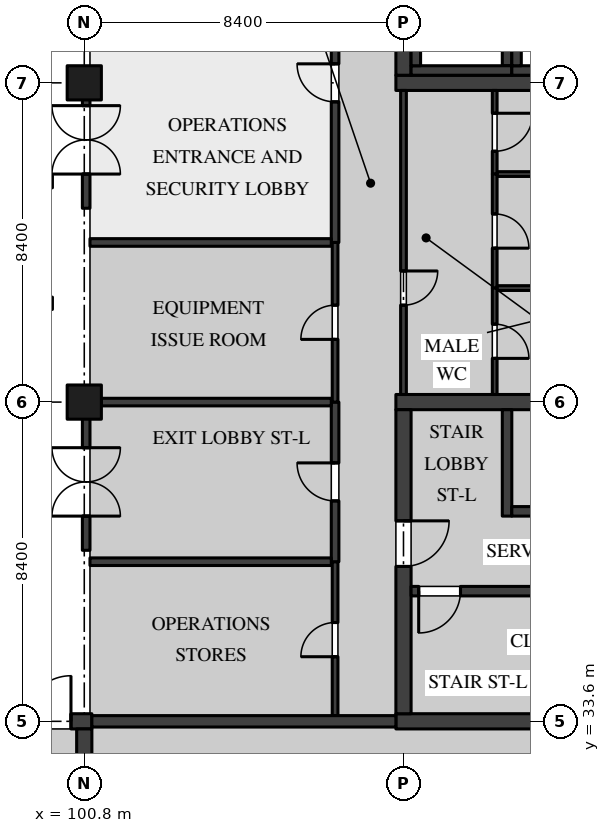
"""IFC4 building model, lengths in metres.
Left out: names, types, materials, properties, quantities, classifications, styles, units other than length and angle.
Written with IfcOpenShell. Run it as: python <this file> out.ifc"""

import sys

from ifc_helpers import new_model, si_unit, direction, frame, frame_2d, origin, origin_2d, place, context, subcontext, project, spatial, rectangle, hollow_circle, extrude, element, fill, save


model = new_model("IFC4")
c1 = context("Model", 3, precision=1e-05, world=origin(), true_north=direction((0.0, 1.0)))
c2 = subcontext(c1, "Body", "Model", "MODEL_VIEW")
j1 = project(units=[si_unit("LENGTHUNIT", "METRE"), si_unit("PLANEANGLEUNIT", "RADIAN")], contexts=[c1])
p1 = place(None, origin())
s1 = spatial("IfcSite", under=j1, at=p1, CompositionType="ELEMENT")
p2 = place(p1, origin())
s2 = spatial("IfcBuilding", under=s1, at=p2, CompositionType="ELEMENT")
p3 = place(p2, origin())
s3 = spatial("IfcBuildingStorey", under=s2, at=p3, CompositionType="ELEMENT", Elevation=0.0)
for number, where, z_axis, x_axis in (
    (1, (100.8, 42.0, 0.0), (0.0, 0.0, 1.0), (1.0, 0.0, 0.0)),
    (2, (100.8, 50.4, 0.0), (0.0, 0.0, 1.0), (1.0, 0.0, 0.0)),
):
    element("IfcColumn", number, at=place(p3, frame(where, z_axis=z_axis, x_axis=x_axis)), inside=s3, PredefinedType="COLUMN", context=c2, shape_type="SweptSolid", body=[
        extrude(rectangle(XDim=0.9, YDim=0.9, at=origin_2d()), origin(), (0.0, 0.0, 1.0), 5.05),
    ])
for number, where, z_axis, x_axis in (
    (3, (99.8, 44.6, 0.0), (0.0, 0.0, 1.0), (1.0, 0.0, 0.0)),
    (4, (99.8, 47.8, 0.0), (0.0, 0.0, 1.0), (1.0, 0.0, 0.0)),
):
    element("IfcColumn", number, at=place(p3, frame(where, z_axis=z_axis, x_axis=x_axis)), inside=s3, PredefinedType="COLUMN", context=c2, shape_type="SweptSolid", body=[
        extrude(hollow_circle(Radius=0.162, WallThickness=0.013, at=origin_2d()), origin(), (0.0, 0.0, 1.0), 4.495),
    ])
p4 = place(p3, frame((92.2, 33.6, 0.0), z_axis=(0.0, 0.0, 1.0), x_axis=(1.0, 0.0, 0.0)))
e5 = element("IfcWall", 5, at=p4, inside=s3, PredefinedType="SHEAR", context=c2, shape_type="SweptSolid", body=[
    extrude(rectangle(XDim=8.8, YDim=0.4, at=frame_2d((4.4, 0.0))), origin(), (0.0, 0.0, 1.0), 5.05),
])
p5 = place(p4, frame((7.05, 0.0, 0.0)))
e6 = element("IfcOpeningElement", 6, at=p5, cuts=e5, PredefinedType="OPENING", context=c2, shape_type="SweptSolid", body=[
    extrude(rectangle(XDim=1.2, YDim=2.1, at=frame_2d((0.6, 1.05))), frame((0.0, 0.21, 0.0), z_axis=(0.0, -1.0, 0.0), x_axis=(1.0, 0.0, 0.0)), (0.0, 0.0, 1.0), 0.42),
])
p6 = place(p3, frame((100.8, 25.4, 0.0), z_axis=(0.0, 0.0, 1.0), x_axis=(0.0, 1.0, 0.0)))
e7 = element("IfcWall", 7, at=p6, inside=s3, PredefinedType="SHEAR", context=c2, shape_type="SweptSolid", body=[
    extrude(rectangle(XDim=8.0, YDim=0.4, at=frame_2d((4.0, 0.0))), origin(), (0.0, 0.0, 1.0), 5.05),
])
p7 = place(p3, frame((109.0, 50.4, 0.0), z_axis=(0.0, 0.0, 1.0), x_axis=(1.0, 0.0, 0.0)))
e8 = element("IfcWall", 8, at=p7, inside=s3, PredefinedType="SHEAR", context=c2, shape_type="SweptSolid", body=[
    extrude(rectangle(XDim=8.8, YDim=0.4, at=frame_2d((4.4, 0.0))), origin(), (0.0, 0.0, 1.0), 5.05),
])
p8 = place(p3, frame((109.2, 50.6, 0.0), z_axis=(0.0, 0.0, 1.0), x_axis=(0.0, 1.0, 0.0)))
e9 = element("IfcWall", 9, at=p8, inside=s3, PredefinedType="SHEAR", context=c2, shape_type="SweptSolid", body=[
    extrude(rectangle(XDim=8.0, YDim=0.4, at=frame_2d((4.0, 0.0))), origin(), (0.0, 0.0, 1.0), 5.05),
])
p9 = place(p8, frame((3.25, 0.0, 0.0)))
e10 = element("IfcOpeningElement", 10, at=p9, cuts=e9, PredefinedType="OPENING", context=c2, shape_type="SweptSolid", body=[
    extrude(rectangle(XDim=1.2, YDim=2.1, at=frame_2d((0.6, 1.05))), frame((0.0, 0.21, 0.0), z_axis=(0.0, -1.0, 0.0), x_axis=(1.0, 0.0, 0.0)), (0.0, 0.0, 1.0), 0.42),
])
for number, where, z_axis, x_axis in (
    (11, (109.0, 33.6, 0.0), (0.0, 0.0, 1.0), (1.0, 0.0, 0.0)),
    (12, (109.0, 42.0, 0.0), (0.0, 0.0, 1.0), (1.0, 0.0, 0.0)),
):
    element("IfcWall", number, at=place(p3, frame(where, z_axis=z_axis, x_axis=x_axis)), inside=s3, PredefinedType="SHEAR", context=c2, shape_type="SweptSolid", body=[
        extrude(rectangle(XDim=8.8, YDim=0.4, at=frame_2d((4.4, 0.0))), origin(), (0.0, 0.0, 1.0), 5.05),
    ])
p10 = place(p3, frame((109.2, 33.8, 0.0), z_axis=(0.0, 0.0, 1.0), x_axis=(0.0, 1.0, 0.0)))
e13 = element("IfcWall", 13, at=p10, inside=s3, PredefinedType="SHEAR", context=c2, shape_type="SweptSolid", body=[
    extrude(rectangle(XDim=8.0, YDim=0.4, at=frame_2d((4.0, 0.0))), origin(), (0.0, 0.0, 1.0), 5.05),
])
p11 = place(p10, frame((3.875, 0.0, 0.0)))
e14 = element("IfcOpeningElement", 14, at=p11, cuts=e13, PredefinedType="OPENING", context=c2, shape_type="SweptSolid", body=[
    extrude(rectangle(XDim=1.2, YDim=2.1, at=frame_2d((0.6, 1.05))), frame((0.0, 0.21, 0.0), z_axis=(0.0, -1.0, 0.0), x_axis=(1.0, 0.0, 0.0)), (0.0, 0.0, 1.0), 0.42),
])
p12 = place(p3, frame((109.4, 37.025, 0.0), z_axis=(0.0, 0.0, 1.0), x_axis=(1.0, 0.0, 0.0)))
e15 = element("IfcWall", 15, at=p12, inside=s3, PredefinedType="SOLIDWALL", context=c2, shape_type="SweptSolid", body=[
    extrude(rectangle(XDim=8.0, YDim=0.25, at=frame_2d((4.0, 0.0))), origin(), (0.0, 0.0, 1.0), 5.05),
])
p13 = place(p12, frame((0.2, 0.0, 0.0)))
e16 = element("IfcOpeningElement", 16, at=p13, cuts=e15, PredefinedType="OPENING", context=c2, shape_type="SweptSolid", body=[
    extrude(rectangle(XDim=1.1, YDim=2.1, at=frame_2d((0.55, 1.05))), frame((0.0, 0.135, 0.0), z_axis=(0.0, -1.0, 0.0), x_axis=(1.0, 0.0, 0.0)), (0.0, 0.0, 1.0), 0.27),
])
p14 = place(p3, frame((111.925, 39.0, 0.0), z_axis=(0.0, 0.0, 1.0), x_axis=(0.0, 1.0, 0.0)))
e17 = element("IfcWall", 17, at=p14, inside=s3, PredefinedType="SOLIDWALL", context=c2, shape_type="SweptSolid", body=[
    extrude(rectangle(XDim=2.8, YDim=0.25, at=frame_2d((1.4, 0.0))), origin(), (0.0, 0.0, 1.0), 5.05),
])
p15 = place(p3, frame((112.05, 39.125, 0.0), z_axis=(0.0, 0.0, 1.0), x_axis=(1.0, 0.0, 0.0)))
e18 = element("IfcWall", 18, at=p15, inside=s3, PredefinedType="SOLIDWALL", context=c2, shape_type="SweptSolid", body=[
    extrude(rectangle(XDim=5.35, YDim=0.25, at=frame_2d((2.675, 0.0))), origin(), (0.0, 0.0, 1.0), 5.05),
])
p16 = place(p15, frame((3.65, 0.0, 0.0)))
e19 = element("IfcOpeningElement", 19, at=p16, cuts=e18, PredefinedType="OPENING", context=c2, shape_type="SweptSolid", body=[
    extrude(rectangle(XDim=0.9, YDim=2.1, at=frame_2d((0.45, 1.05))), frame((0.0, 0.135, 0.0), z_axis=(0.0, -1.0, 0.0), x_axis=(1.0, 0.0, 0.0)), (0.0, 0.0, 1.0), 0.27),
])
p17 = place(p15, frame((0.9, 0.0, 0.0)))
e20 = element("IfcOpeningElement", 20, at=p17, cuts=e18, PredefinedType="OPENING", context=c2, shape_type="SweptSolid", body=[
    extrude(rectangle(XDim=0.8, YDim=2.1, at=frame_2d((0.4, 1.05))), frame((0.0, 0.135, 0.0), z_axis=(0.0, -1.0, 0.0), x_axis=(1.0, 0.0, 0.0)), (0.0, 0.0, 1.0), 0.27),
])
p18 = place(p3, frame((111.925, 50.85, 0.0), z_axis=(0.0, 0.0, 1.0), x_axis=(0.0, 1.0, 0.0)))
e21 = element("IfcWall", 21, at=p18, inside=s3, PredefinedType="SOLIDWALL", context=c2, shape_type="SweptSolid", body=[
    extrude(rectangle(XDim=2.3, YDim=0.25, at=frame_2d((1.15, 0.0))), origin(), (0.0, 0.0, 1.0), 5.05),
])
p19 = place(p3, frame((109.4, 50.725, 0.0), z_axis=(0.0, 0.0, 1.0), x_axis=(1.0, 0.0, 0.0)))
e22 = element("IfcWall", 22, at=p19, inside=s3, PredefinedType="SOLIDWALL", context=c2, shape_type="SweptSolid", body=[
    extrude(rectangle(XDim=2.65, YDim=0.25, at=frame_2d((1.325, 0.0))), origin(), (0.0, 0.0, 1.0), 5.05),
])
p20 = place(p3, frame((109.525, 50.85, 0.0), z_axis=(0.0, 0.0, 1.0), x_axis=(0.0, 1.0, 0.0)))
e23 = element("IfcWall", 23, at=p20, inside=s3, PredefinedType="SOLIDWALL", context=c2, shape_type="SweptSolid", body=[
    extrude(rectangle(XDim=2.3, YDim=0.25, at=frame_2d((1.15, 0.0))), origin(), (0.0, 0.0, 1.0), 5.05),
])
p21 = place(p3, frame((112.05, 50.725, 0.0), z_axis=(0.0, 0.0, 1.0), x_axis=(1.0, 0.0, 0.0)))
e24 = element("IfcWall", 24, at=p21, inside=s3, PredefinedType="SOLIDWALL", context=c2, shape_type="SweptSolid", body=[
    extrude(rectangle(XDim=2.7, YDim=0.25, at=frame_2d((1.35, 0.0))), origin(), (0.0, 0.0, 1.0), 5.05),
])
p22 = place(p3, frame((112.175, 50.85, 0.0), z_axis=(0.0, 0.0, 1.0), x_axis=(0.0, 1.0, 0.0)))
e25 = element("IfcWall", 25, at=p22, inside=s3, PredefinedType="SOLIDWALL", context=c2, shape_type="SweptSolid", body=[
    extrude(rectangle(XDim=2.3, YDim=0.25, at=frame_2d((1.15, 0.0))), origin(), (0.0, 0.0, 1.0), 5.05),
])
p23 = place(p3, frame((109.2, 42.2, 0.0), z_axis=(0.0, 0.0, 1.0), x_axis=(0.0, 1.0, 0.0)))
e26 = element("IfcWall", 26, at=p23, inside=s3, PredefinedType="PARTITIONING", context=c2, shape_type="SweptSolid", body=[
    extrude(rectangle(XDim=8.0, YDim=0.15, at=frame_2d((4.0, 0.0))), origin(), (0.0, 0.0, 1.0), 5.05),
])
p24 = place(p23, frame((2.35, 0.0, 0.0)))
e27 = element("IfcOpeningElement", 27, at=p24, cuts=e26, PredefinedType="OPENING", context=c2, shape_type="SweptSolid", body=[
    extrude(rectangle(XDim=0.9, YDim=2.1, at=frame_2d((0.45, 1.05))), frame((0.0, 0.085, 0.0), z_axis=(0.0, -1.0, 0.0), x_axis=(1.0, 0.0, 0.0)), (0.0, 0.0, 1.0), 0.17),
])
p25 = place(p3, frame((107.4, 33.75, 0.0), z_axis=(0.0, 0.0, 1.0), x_axis=(0.0, 1.0, 0.0)))
e28 = element("IfcWall", 28, at=p25, inside=s3, PredefinedType="PARTITIONING", context=c2, shape_type="SweptSolid", body=[
    extrude(rectangle(XDim=4.05, YDim=0.15, at=frame_2d((2.025, 0.0))), origin(), (0.0, 0.0, 1.0), 5.05),
])
p26 = place(p25, frame((1.55, 0.0, 0.0)))
e29 = element("IfcOpeningElement", 29, at=p26, cuts=e28, PredefinedType="OPENING", context=c2, shape_type="SweptSolid", body=[
    extrude(rectangle(XDim=0.9, YDim=2.1, at=frame_2d((0.45, 1.05))), frame((0.0, 0.085, 0.0), z_axis=(0.0, -1.0, 0.0), x_axis=(1.0, 0.0, 0.0)), (0.0, 0.0, 1.0), 0.17),
])
p27 = place(p3, frame((107.4, 37.8, 0.0), z_axis=(0.0, 0.0, 1.0), x_axis=(0.0, 1.0, 0.0)))
e30 = element("IfcWall", 30, at=p27, inside=s3, PredefinedType="PARTITIONING", context=c2, shape_type="SweptSolid", body=[
    extrude(rectangle(XDim=4.2, YDim=0.2, at=frame_2d((2.1, 0.0))), origin(), (0.0, 0.0, 1.0), 5.05),
])
p28 = place(p27, frame((1.6, 0.0, 0.0)))
e31 = element("IfcOpeningElement", 31, at=p28, cuts=e30, PredefinedType="OPENING", context=c2, shape_type="SweptSolid", body=[
    extrude(rectangle(XDim=1.0, YDim=2.4, at=frame_2d((0.5, 1.2))), frame((0.0, 0.11, 0.0), z_axis=(0.0, -1.0, 0.0), x_axis=(1.0, 0.0, 0.0)), (0.0, 0.0, 1.0), 0.22),
])
p29 = place(p3, frame((107.4, 42.0, 0.0), z_axis=(0.0, 0.0, 1.0), x_axis=(0.0, 1.0, 0.0)))
e32 = element("IfcWall", 32, at=p29, inside=s3, PredefinedType="PARTITIONING", context=c2, shape_type="SweptSolid", body=[
    extrude(rectangle(XDim=4.2, YDim=0.15, at=frame_2d((2.1, 0.0))), origin(), (0.0, 0.0, 1.0), 5.05),
])
p30 = place(p29, frame((1.65, 0.0, 0.0)))
e33 = element("IfcOpeningElement", 33, at=p30, cuts=e32, PredefinedType="OPENING", context=c2, shape_type="SweptSolid", body=[
    extrude(rectangle(XDim=0.9, YDim=2.1, at=frame_2d((0.45, 1.05))), frame((0.0, 0.085, 0.0), z_axis=(0.0, -1.0, 0.0), x_axis=(1.0, 0.0, 0.0)), (0.0, 0.0, 1.0), 0.17),
])
p31 = place(p3, frame((107.4, 46.2, 0.0), z_axis=(0.0, 0.0, 1.0), x_axis=(0.0, 1.0, 0.0)))
e34 = element("IfcWall", 34, at=p31, inside=s3, PredefinedType="PARTITIONING", context=c2, shape_type="SweptSolid", body=[
    extrude(rectangle(XDim=8.4, YDim=0.2, at=frame_2d((4.2, 0.0))), origin(), (0.0, 0.0, 1.0), 5.05),
])
p32 = place(p31, frame((3.7, 0.0, 0.0)))
e35 = element("IfcOpeningElement", 35, at=p32, cuts=e34, PredefinedType="OPENING", context=c2, shape_type="SweptSolid", body=[
    extrude(rectangle(XDim=1.0, YDim=2.4, at=frame_2d((0.5, 1.2))), frame((0.0, 0.11, 0.0), z_axis=(0.0, -1.0, 0.0), x_axis=(1.0, 0.0, 0.0)), (0.0, 0.0, 1.0), 0.22),
])
p33 = place(p3, frame((111.662, 48.0, 0.0), z_axis=(0.0, 0.0, 1.0), x_axis=(1.0, 0.0, 0.0)))
e36 = element("IfcWall", 36, at=p33, inside=s3, PredefinedType="PARTITIONING", context=c2, shape_type="SweptSolid", body=[
    extrude(rectangle(XDim=5.863, YDim=0.125, at=frame_2d((2.931, 0.0))), origin(), (0.0, 0.0, 1.0), 5.05),
])
p34 = place(p3, frame((111.6, 48.0, 0.0), z_axis=(0.0, 0.0, 1.0), x_axis=(0.0, 1.0, 0.0)))
e37 = element("IfcWall", 37, at=p34, inside=s3, PredefinedType="PARTITIONING", context=c2, shape_type="SweptSolid", body=[
    extrude(rectangle(XDim=2.2, YDim=0.125, at=frame_2d((1.1, 0.0))), origin(), (0.0, 0.0, 1.0), 5.05),
])
p35 = place(p34, frame((0.6, 0.0, 0.0)))
e38 = element("IfcOpeningElement", 38, at=p35, cuts=e37, PredefinedType="OPENING", context=c2, shape_type="SweptSolid", body=[
    extrude(rectangle(XDim=1.0, YDim=2.1, at=frame_2d((0.5, 1.05))), frame((0.0, 0.073, 0.0), z_axis=(0.0, -1.0, 0.0), x_axis=(1.0, 0.0, 0.0)), (0.0, 0.0, 1.0), 0.145),
])
p36 = place(p3, frame((111.6, 45.0, 0.0), z_axis=(0.0, 0.0, 1.0), x_axis=(0.0, 1.0, 0.0)))
e39 = element("IfcWall", 39, at=p36, inside=s3, PredefinedType="PARTITIONING", context=c2, shape_type="SweptSolid", body=[
    extrude(rectangle(XDim=3.0, YDim=0.125, at=frame_2d((1.5, 0.0))), origin(), (0.0, 0.0, 1.0), 5.05),
])
p37 = place(p36, frame((1.05, 0.0, 0.0)))
e40 = element("IfcOpeningElement", 40, at=p37, cuts=e39, PredefinedType="OPENING", context=c2, shape_type="SweptSolid", body=[
    extrude(rectangle(XDim=0.9, YDim=2.1, at=frame_2d((0.45, 1.05))), frame((0.0, 0.073, 0.0), z_axis=(0.0, -1.0, 0.0), x_axis=(1.0, 0.0, 0.0)), (0.0, 0.0, 1.0), 0.145),
])
p38 = place(p3, frame((111.662, 45.0, 0.0), z_axis=(0.0, 0.0, 1.0), x_axis=(1.0, 0.0, 0.0)))
e41 = element("IfcWall", 41, at=p38, inside=s3, PredefinedType="PARTITIONING", context=c2, shape_type="SweptSolid", body=[
    extrude(rectangle(XDim=5.863, YDim=0.125, at=frame_2d((2.931, 0.0))), origin(), (0.0, 0.0, 1.0), 5.05),
])
p39 = place(p3, frame((111.6, 42.2, 0.0), z_axis=(0.0, 0.0, 1.0), x_axis=(0.0, 1.0, 0.0)))
e42 = element("IfcWall", 42, at=p39, inside=s3, PredefinedType="PARTITIONING", context=c2, shape_type="SweptSolid", body=[
    extrude(rectangle(XDim=2.8, YDim=0.125, at=frame_2d((1.4, 0.0))), origin(), (0.0, 0.0, 1.0), 5.05),
])
p40 = place(p39, frame((0.95, 0.0, 0.0)))
e43 = element("IfcOpeningElement", 43, at=p40, cuts=e42, PredefinedType="OPENING", context=c2, shape_type="SweptSolid", body=[
    extrude(rectangle(XDim=0.9, YDim=2.1, at=frame_2d((0.45, 1.05))), frame((0.0, 0.073, 0.0), z_axis=(0.0, -1.0, 0.0), x_axis=(1.0, 0.0, 0.0)), (0.0, 0.0, 1.0), 0.145),
])
p41 = place(p3, frame((100.95, 37.8, 0.0), z_axis=(0.0, 0.0, 1.0), x_axis=(1.0, 0.0, 0.0)))
e44 = element("IfcWall", 44, at=p41, inside=s3, PredefinedType="PARTITIONING", context=c2, shape_type="SweptSolid", body=[
    extrude(rectangle(XDim=6.35, YDim=0.2, at=frame_2d((3.175, 0.0))), origin(), (0.0, 0.0, 1.0), 5.05),
])
p42 = place(p3, frame((101.25, 42.0, 0.0), z_axis=(0.0, 0.0, 1.0), x_axis=(1.0, 0.0, 0.0)))
e45 = element("IfcWall", 45, at=p42, inside=s3, PredefinedType="PARTITIONING", context=c2, shape_type="SweptSolid", body=[
    extrude(rectangle(XDim=6.05, YDim=0.2, at=frame_2d((3.025, 0.0))), origin(), (0.0, 0.0, 1.0), 5.05),
])
p43 = place(p3, frame((100.95, 46.2, 0.0), z_axis=(0.0, 0.0, 1.0), x_axis=(1.0, 0.0, 0.0)))
e46 = element("IfcWall", 46, at=p43, inside=s3, PredefinedType="PARTITIONING", context=c2, shape_type="SweptSolid", body=[
    extrude(rectangle(XDim=6.35, YDim=0.2, at=frame_2d((3.175, 0.0))), origin(), (0.0, 0.0, 1.0), 5.05),
])
p44 = place(p3, frame((100.85, 49.97, 0.0), z_axis=(0.0, 0.0, 1.0), x_axis=(0.0, -1.0, 0.0)))
e47 = element("IfcWall", 47, at=p44, inside=s3, PredefinedType="SOLIDWALL", context=c2, shape_type="SweptSolid", body=[
    extrude(rectangle(XDim=2.87, YDim=0.2, at=frame_2d((1.435, 0.0))), origin(), (0.0, 0.0, 1.0), 5.05),
])
p45 = place(p44, frame((0.17, 0.0, 0.0)))
e48 = element("IfcOpeningElement", 48, at=p45, cuts=e47, PredefinedType="OPENING", context=c2, shape_type="SweptSolid", body=[
    extrude(rectangle(XDim=1.8, YDim=2.4, at=frame_2d((0.9, 1.2))), frame((0.0, 0.11, 0.0), z_axis=(0.0, -1.0, 0.0), x_axis=(1.0, 0.0, 0.0)), (0.0, 0.0, 1.0), 0.22),
])
p46 = place(p3, frame((100.85, 41.57, 0.0), z_axis=(0.0, 0.0, 1.0), x_axis=(0.0, -1.0, 0.0)))
e49 = element("IfcWall", 49, at=p46, inside=s3, PredefinedType="SOLIDWALL", context=c2, shape_type="SweptSolid", body=[
    extrude(rectangle(XDim=3.47, YDim=0.2, at=frame_2d((1.735, 0.0))), origin(), (0.0, 0.0, 1.0), 5.05),
])
p47 = place(p46, frame((0.77, 0.0, 0.0)))
e50 = element("IfcOpeningElement", 50, at=p47, cuts=e49, PredefinedType="OPENING", context=c2, shape_type="SweptSolid", body=[
    extrude(rectangle(XDim=1.8, YDim=2.4, at=frame_2d((0.9, 1.2))), frame((0.0, 0.11, 0.0), z_axis=(0.0, -1.0, 0.0), x_axis=(1.0, 0.0, 0.0)), (0.0, 0.0, 1.0), 0.22),
])
p48 = place(p3, frame((109.0, 33.6, 0.0), z_axis=(0.0, 0.0, 1.0), x_axis=(-1.0, 0.0, 0.0)))
e51 = element("IfcWall", 51, at=p48, inside=s3, PredefinedType="SOLIDWALL", context=c2, shape_type="SweptSolid", body=[
    extrude(rectangle(XDim=8.0, YDim=0.3, at=frame_2d((4.0, 0.0))), origin(), (0.0, 0.0, 1.0), 5.05),
])
p49 = place(p5, origin())
e52 = element("IfcDoor", 52, at=p49, inside=s3, OperationType="SINGLE_SWING_LEFT", PredefinedType="DOOR", context=c2, shape_type="SweptSolid", body=[
    extrude(rectangle(XDim=1.2, YDim=2.1, at=frame_2d((0.6, 1.05))), frame((0.0, 0.035, 0.0), z_axis=(0.0, -1.0, 0.0), x_axis=(1.0, 0.0, 0.0)), (0.0, 0.0, 1.0), 0.07),
])
fill(e6, e52)
p50 = place(p11, frame((1.2, 0.0, 0.0), z_axis=(0.0, 0.0, 1.0), x_axis=(-1.0, 0.0, 0.0)))
e53 = element("IfcDoor", 53, at=p50, inside=s3, OperationType="SINGLE_SWING_RIGHT", PredefinedType="DOOR", context=c2, shape_type="SweptSolid", body=[
    extrude(rectangle(XDim=1.2, YDim=2.1, at=frame_2d((0.6, 1.05))), frame((0.0, 0.035, 0.0), z_axis=(0.0, -1.0, 0.0), x_axis=(1.0, 0.0, 0.0)), (0.0, 0.0, 1.0), 0.07),
])
fill(e14, e53)
p51 = place(p13, frame((1.1, 0.0, 0.0), z_axis=(0.0, 0.0, 1.0), x_axis=(-1.0, 0.0, 0.0)))
e54 = element("IfcDoor", 54, at=p51, inside=s3, OperationType="SINGLE_SWING_LEFT", PredefinedType="DOOR", context=c2, shape_type="SweptSolid", body=[
    extrude(rectangle(XDim=1.1, YDim=2.1, at=frame_2d((0.55, 1.05))), frame((0.0, 0.035, 0.0), z_axis=(0.0, -1.0, 0.0), x_axis=(1.0, 0.0, 0.0)), (0.0, 0.0, 1.0), 0.07),
])
fill(e16, e54)
p52 = place(p35, frame((1.0, 0.0, 0.0), z_axis=(0.0, 0.0, 1.0), x_axis=(-1.0, 0.0, 0.0)))
e55 = element("IfcDoor", 55, at=p52, inside=s3, OperationType="SINGLE_SWING_RIGHT", PredefinedType="DOOR", context=c2, shape_type="SweptSolid", body=[
    extrude(rectangle(XDim=1.0, YDim=2.1, at=frame_2d((0.5, 1.05))), frame((0.0, 0.02, 0.0), z_axis=(0.0, -1.0, 0.0), x_axis=(1.0, 0.0, 0.0)), (0.0, 0.0, 1.0), 0.04),
])
fill(e38, e55)
p53 = place(p37, frame((0.9, 0.0, 0.0), z_axis=(0.0, 0.0, 1.0), x_axis=(-1.0, 0.0, 0.0)))
e56 = element("IfcDoor", 56, at=p53, inside=s3, OperationType="SINGLE_SWING_LEFT", PredefinedType="DOOR", context=c2, shape_type="SweptSolid", body=[
    extrude(rectangle(XDim=0.9, YDim=2.1, at=frame_2d((0.45, 1.05))), frame((0.0, 0.02, 0.0), z_axis=(0.0, -1.0, 0.0), x_axis=(1.0, 0.0, 0.0)), (0.0, 0.0, 1.0), 0.04),
])
fill(e40, e56)
p54 = place(p24, frame((0.9, 0.0, 0.0), z_axis=(0.0, 0.0, 1.0), x_axis=(-1.0, 0.0, 0.0)))
e57 = element("IfcDoor", 57, at=p54, inside=s3, OperationType="SINGLE_SWING_RIGHT", PredefinedType="DOOR", context=c2, shape_type="SweptSolid", body=[
    extrude(rectangle(XDim=0.9, YDim=2.1, at=frame_2d((0.45, 1.05))), frame((0.0, 0.025, 0.0), z_axis=(0.0, -1.0, 0.0), x_axis=(1.0, 0.0, 0.0)), (0.0, 0.0, 1.0), 0.05),
])
fill(e27, e57)
p55 = place(p40, frame((0.9, 0.0, 0.0), z_axis=(0.0, 0.0, 1.0), x_axis=(-1.0, 0.0, 0.0)))
e58 = element("IfcDoor", 58, at=p55, inside=s3, OperationType="SINGLE_SWING_LEFT", PredefinedType="DOOR", context=c2, shape_type="SweptSolid", body=[
    extrude(rectangle(XDim=0.9, YDim=2.1, at=frame_2d((0.45, 1.05))), frame((0.0, 0.02, 0.0), z_axis=(0.0, -1.0, 0.0), x_axis=(1.0, 0.0, 0.0)), (0.0, 0.0, 1.0), 0.04),
])
fill(e43, e58)
p56 = place(p26, origin())
e59 = element("IfcDoor", 59, at=p56, inside=s3, OperationType="SINGLE_SWING_RIGHT", PredefinedType="DOOR", context=c2, shape_type="SweptSolid", body=[
    extrude(rectangle(XDim=0.9, YDim=2.1, at=frame_2d((0.45, 1.05))), frame((0.0, 0.025, 0.0), z_axis=(0.0, -1.0, 0.0), x_axis=(1.0, 0.0, 0.0)), (0.0, 0.0, 1.0), 0.05),
])
fill(e29, e59)
p57 = place(p28, origin())
e60 = element("IfcDoor", 60, at=p57, inside=s3, OperationType="SINGLE_SWING_LEFT", PredefinedType="DOOR", context=c2, shape_type="SweptSolid", body=[
    extrude(rectangle(XDim=1.0, YDim=2.4, at=frame_2d((0.5, 1.2))), frame((0.0, 0.03, 0.0), z_axis=(0.0, -1.0, 0.0), x_axis=(1.0, 0.0, 0.0)), (0.0, 0.0, 1.0), 0.06),
])
fill(e31, e60)
p58 = place(p30, origin())
e61 = element("IfcDoor", 61, at=p58, inside=s3, OperationType="SINGLE_SWING_RIGHT", PredefinedType="DOOR", context=c2, shape_type="SweptSolid", body=[
    extrude(rectangle(XDim=0.9, YDim=2.1, at=frame_2d((0.45, 1.05))), frame((0.0, 0.025, 0.0), z_axis=(0.0, -1.0, 0.0), x_axis=(1.0, 0.0, 0.0)), (0.0, 0.0, 1.0), 0.05),
])
fill(e33, e61)
p59 = place(p32, origin())
e62 = element("IfcDoor", 62, at=p59, inside=s3, OperationType="SINGLE_SWING_LEFT", PredefinedType="DOOR", context=c2, shape_type="SweptSolid", body=[
    extrude(rectangle(XDim=1.0, YDim=2.4, at=frame_2d((0.5, 1.2))), frame((0.0, 0.03, 0.0), z_axis=(0.0, -1.0, 0.0), x_axis=(1.0, 0.0, 0.0)), (0.0, 0.0, 1.0), 0.06),
])
fill(e35, e62)
p60 = place(p45, frame((1.8, 0.0, 0.0), z_axis=(0.0, 0.0, 1.0), x_axis=(-1.0, 0.0, 0.0)))
e63 = element("IfcDoor", 63, at=p60, inside=s3, OperationType="DOUBLE_DOOR_DOUBLE_SWING", PredefinedType="DOOR", context=c2, shape_type="SweptSolid", body=[
    extrude(rectangle(XDim=1.8, YDim=2.4, at=frame_2d((0.9, 1.2))), frame((0.0, 0.025, 0.0), z_axis=(0.0, -1.0, 0.0), x_axis=(1.0, 0.0, 0.0)), (0.0, 0.0, 1.0), 0.05),
])
fill(e48, e63)
p61 = place(p47, frame((1.8, 0.0, 0.0), z_axis=(0.0, 0.0, 1.0), x_axis=(-1.0, 0.0, 0.0)))
e64 = element("IfcDoor", 64, at=p61, inside=s3, OperationType="DOUBLE_DOOR_DOUBLE_SWING", PredefinedType="DOOR", context=c2, shape_type="SweptSolid", body=[
    extrude(rectangle(XDim=1.8, YDim=2.4, at=frame_2d((0.9, 1.2))), frame((0.0, 0.025, 0.0), z_axis=(0.0, -1.0, 0.0), x_axis=(1.0, 0.0, 0.0)), (0.0, 0.0, 1.0), 0.05),
])
fill(e50, e64)
save(model, sys.argv[1])
